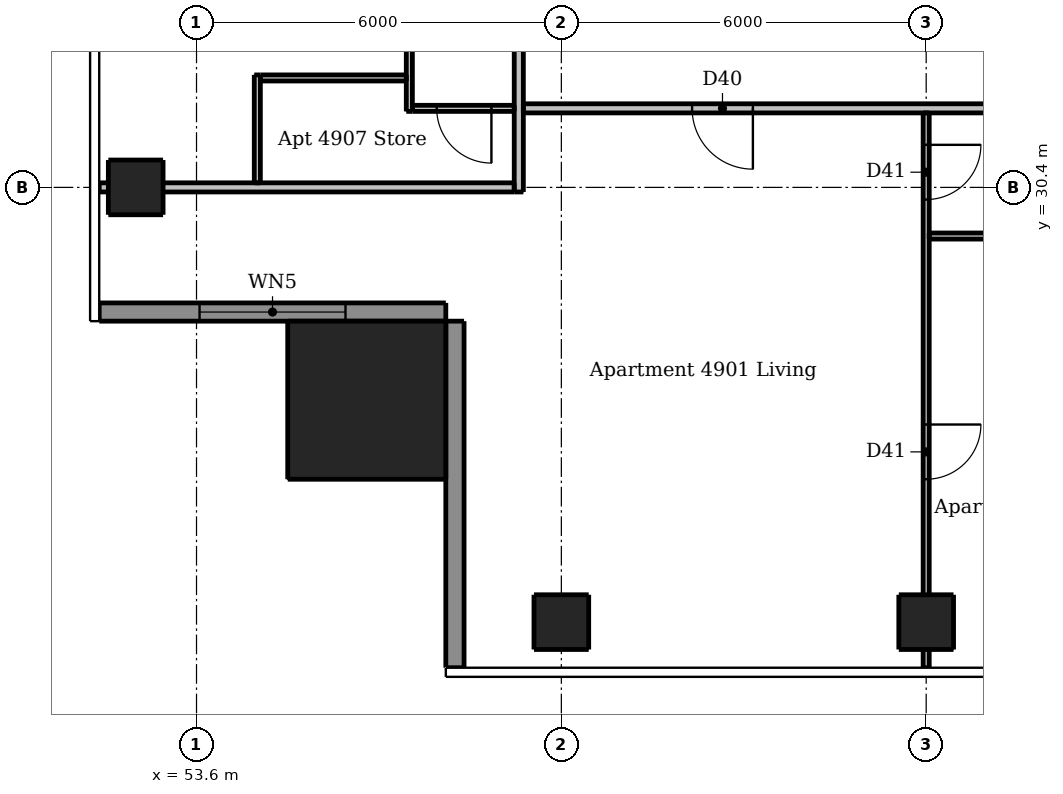
"""IFC4 building model, lengths in metres.
Left out: names, types, materials, properties, quantities, classifications, styles, units other than length and angle.
Written with IfcOpenShell. Run it as: python <this file> out.ifc"""

import sys

from ifc_helpers import new_model, si_unit, direction, frame, frame_2d, origin, origin_2d, place, context, subcontext, project, spatial, rectangle, extrude, element, fill, save


model = new_model("IFC4")
c1 = context("Model", 3, precision=1e-05, world=origin(), true_north=direction((0.0, 1.0)))
c2 = subcontext(c1, "Body", "Model", "MODEL_VIEW")
j1 = project(units=[si_unit("LENGTHUNIT", "METRE"), si_unit("PLANEANGLEUNIT", "RADIAN")], contexts=[c1])
p1 = place(None, origin())
s1 = spatial("IfcSite", under=j1, at=p1, CompositionType="ELEMENT")
p2 = place(p1, origin())
s2 = spatial("IfcBuilding", under=s1, at=p2, CompositionType="ELEMENT")
p3 = place(p2, frame((0.0, 0.0, 187.0)))
s3 = spatial("IfcBuildingStorey", under=s2, at=p3, CompositionType="ELEMENT", Elevation=187.0)
for number, where, z_axis, x_axis in (
    (1, (59.6, 23.25, 0.0), (0.0, 0.0, 1.0), (1.0, 0.0, 0.0)),
    (2, (65.6, 23.25, 0.0), (0.0, 0.0, 1.0), (1.0, 0.0, 0.0)),
    (3, (52.6, 30.4, 0.0), (0.0, 0.0, 1.0), (1.0, 0.0, 0.0)),
):
    element("IfcColumn", number, at=place(p3, frame(where, z_axis=z_axis, x_axis=x_axis)), inside=s3, PredefinedType="COLUMN", context=c2, shape_type="SweptSolid", body=[
        extrude(rectangle(XDim=0.9, YDim=0.9, at=origin_2d()), origin(), (0.0, 0.0, 1.0), 3.05),
    ])
p4 = place(p3, frame((56.4, 26.9, 0.0), z_axis=(0.0, 0.0, 1.0), x_axis=(1.0, 0.0, 0.0)))
e4 = element("IfcColumn", 4, at=p4, inside=s3, PredefinedType="COLUMN", context=c2, shape_type="SweptSolid", body=[
    extrude(rectangle(XDim=2.6, YDim=2.6, at=origin_2d()), origin(), (0.0, 0.0, 1.0), 3.3),
])
p5 = place(p3, frame((52.0, 28.35, 0.0), z_axis=(0.0, 0.0, 1.0), x_axis=(1.0, 0.0, 0.0)))
e5 = element("IfcWall", 5, at=p5, inside=s3, PredefinedType="SOLIDWALL", context=c2, shape_type="SweptSolid", body=[
    extrude(rectangle(XDim=5.7, YDim=0.3, at=frame_2d((2.85, 0.0))), origin(), (0.0, 0.0, 1.0), 3.05),
])
p6 = place(p5, frame((1.65, 0.0, 0.15)))
e6 = element("IfcOpeningElement", 6, at=p6, cuts=e5, PredefinedType="OPENING", context=c2, shape_type="SweptSolid", body=[
    extrude(rectangle(XDim=2.4, YDim=2.1, at=frame_2d((1.2, 1.05))), frame((0.0, 0.16, 0.0), z_axis=(0.0, -1.0, 0.0), x_axis=(1.0, 0.0, 0.0)), (0.0, 0.0, 1.0), 0.32),
])
p7 = place(p3, frame((57.85, 28.2, 0.0), z_axis=(0.0, 0.0, 1.0), x_axis=(0.0, -1.0, 0.0)))
e7 = element("IfcWall", 7, at=p7, inside=s3, PredefinedType="SOLIDWALL", context=c2, shape_type="SweptSolid", body=[
    extrude(rectangle(XDim=5.7, YDim=0.3, at=frame_2d((2.85, 0.0))), origin(), (0.0, 0.0, 1.0), 3.05),
])
p8 = place(p3, frame((54.6, 30.475, 0.0), z_axis=(0.0, 0.0, 1.0), x_axis=(0.0, 1.0, 0.0)))
e8 = element("IfcWall", 8, at=p8, inside=s3, PredefinedType="PARTITIONING", context=c2, shape_type="SweptSolid", body=[
    extrude(rectangle(XDim=1.775, YDim=0.1, at=frame_2d((0.887, 0.0))), origin(), (0.0, 0.0, 1.0), 3.05),
])
p9 = place(p3, frame((57.1, 31.65, 0.0), z_axis=(0.0, 0.0, 1.0), x_axis=(0.0, 1.0, 0.0)))
e9 = element("IfcWall", 9, at=p9, inside=s3, PredefinedType="PARTITIONING", context=c2, shape_type="SweptSolid", body=[
    extrude(rectangle(XDim=16.675, YDim=0.1, at=frame_2d((8.337, 0.0))), origin(), (0.0, 0.0, 1.0), 3.05),
])
p10 = place(p9, frame((3.7, 0.0, 0.0)))
e10 = element("IfcOpeningElement", 10, at=p10, cuts=e9, PredefinedType="OPENING", context=c2, shape_type="SweptSolid", body=[
    extrude(rectangle(XDim=0.9, YDim=2.1, at=frame_2d((0.45, 1.05))), frame((0.0, 0.06, 0.0), z_axis=(0.0, -1.0, 0.0), x_axis=(1.0, 0.0, 0.0)), (0.0, 0.0, 1.0), 0.12),
])
p11 = place(p9, frame((8.8, 0.0, 0.0)))
e11 = element("IfcOpeningElement", 11, at=p11, cuts=e9, PredefinedType="OPENING", context=c2, shape_type="SweptSolid", body=[
    extrude(rectangle(XDim=0.9, YDim=2.1, at=frame_2d((0.45, 1.05))), frame((0.0, 0.06, 0.0), z_axis=(0.0, -1.0, 0.0), x_axis=(1.0, 0.0, 0.0)), (0.0, 0.0, 1.0), 0.12),
])
p12 = place(p9, frame((14.5, 0.0, 0.0)))
e12 = element("IfcOpeningElement", 12, at=p12, cuts=e9, PredefinedType="OPENING", context=c2, shape_type="SweptSolid", body=[
    extrude(rectangle(XDim=0.9, YDim=2.1, at=frame_2d((0.45, 1.05))), frame((0.0, 0.06, 0.0), z_axis=(0.0, -1.0, 0.0), x_axis=(1.0, 0.0, 0.0)), (0.0, 0.0, 1.0), 0.12),
])
p13 = place(p9, frame((11.55, 0.0, 0.0)))
e13 = element("IfcOpeningElement", 13, at=p13, cuts=e9, PredefinedType="OPENING", context=c2, shape_type="SweptSolid", body=[
    extrude(rectangle(XDim=0.8, YDim=2.1, at=frame_2d((0.4, 1.05))), frame((0.0, 0.06, 0.0), z_axis=(0.0, -1.0, 0.0), x_axis=(1.0, 0.0, 0.0)), (0.0, 0.0, 1.0), 0.12),
])
p14 = place(p3, frame((65.6, 31.625, 0.0), z_axis=(0.0, 0.0, 1.0), x_axis=(0.0, -1.0, 0.0)))
e14 = element("IfcWall", 14, at=p14, inside=s3, PredefinedType="PARTITIONING", context=c2, shape_type="SweptSolid", body=[
    extrude(rectangle(XDim=9.125, YDim=0.1, at=frame_2d((4.562, 0.0))), origin(), (0.0, 0.0, 1.0), 2.516),
])
p15 = place(p14, frame((0.525, 0.0, 0.0)))
e15 = element("IfcOpeningElement", 15, at=p15, cuts=e14, PredefinedType="OPENING", context=c2, shape_type="SweptSolid", body=[
    extrude(rectangle(XDim=0.9, YDim=2.1, at=frame_2d((0.45, 1.05))), frame((0.0, 0.06, 0.0), z_axis=(0.0, -1.0, 0.0), x_axis=(1.0, 0.0, 0.0)), (0.0, 0.0, 1.0), 0.12),
])
p16 = place(p14, frame((5.125, 0.0, 0.0)))
e16 = element("IfcOpeningElement", 16, at=p16, cuts=e14, PredefinedType="OPENING", context=c2, shape_type="SweptSolid", body=[
    extrude(rectangle(XDim=0.9, YDim=2.1, at=frame_2d((0.45, 1.05))), frame((0.0, 0.06, 0.0), z_axis=(0.0, -1.0, 0.0), x_axis=(1.0, 0.0, 0.0)), (0.0, 0.0, 1.0), 0.12),
])
p17 = place(p3, frame((54.65, 32.2, 0.0), z_axis=(0.0, 0.0, 1.0), x_axis=(1.0, 0.0, 0.0)))
e17 = element("IfcWall", 17, at=p17, inside=s3, PredefinedType="PARTITIONING", context=c2, shape_type="SweptSolid", body=[
    extrude(rectangle(XDim=2.4, YDim=0.1, at=frame_2d((1.2, 0.0))), origin(), (0.0, 0.0, 1.0), 3.05),
])
p18 = place(p3, frame((58.825, 31.7, 0.0), z_axis=(0.0, 0.0, 1.0), x_axis=(-1.0, 0.0, 0.0)))
e18 = element("IfcWall", 18, at=p18, inside=s3, PredefinedType="PARTITIONING", context=c2, shape_type="SweptSolid", body=[
    extrude(rectangle(XDim=1.675, YDim=0.1, at=frame_2d((0.837, 0.0))), origin(), (0.0, 0.0, 1.0), 3.05),
])
p19 = place(p18, frame((0.375, 0.0, 0.0)))
e19 = element("IfcOpeningElement", 19, at=p19, cuts=e18, PredefinedType="OPENING", context=c2, shape_type="SweptSolid", body=[
    extrude(rectangle(XDim=0.9, YDim=2.1, at=frame_2d((0.45, 1.05))), frame((0.0, 0.06, 0.0), z_axis=(0.0, -1.0, 0.0), x_axis=(1.0, 0.0, 0.0)), (0.0, 0.0, 1.0), 0.12),
])
p20 = place(p3, frame((65.65, 29.6, 0.0), z_axis=(0.0, 0.0, 1.0), x_axis=(1.0, 0.0, 0.0)))
e20 = element("IfcWall", 20, at=p20, inside=s3, PredefinedType="PARTITIONING", context=c2, shape_type="SweptSolid", body=[
    extrude(rectangle(XDim=5.875, YDim=0.1, at=frame_2d((2.938, 0.0))), origin(), (0.0, 0.0, 1.0), 3.05),
])
p21 = place(p20, frame((3.75, 0.0, 0.0)))
e21 = element("IfcOpeningElement", 21, at=p21, cuts=e20, PredefinedType="OPENING", context=c2, shape_type="SweptSolid", body=[
    extrude(rectangle(XDim=0.8, YDim=2.1, at=frame_2d((0.4, 1.05))), frame((0.0, 0.06, 0.0), z_axis=(0.0, -1.0, 0.0), x_axis=(1.0, 0.0, 0.0)), (0.0, 0.0, 1.0), 0.12),
])
p22 = place(p3, frame((58.9, 30.325, 0.0), z_axis=(0.0, 0.0, 1.0), x_axis=(0.0, 1.0, 0.0)))
e22 = element("IfcWall", 22, at=p22, inside=s3, PredefinedType="PARTITIONING", context=c2, shape_type="SweptSolid", body=[
    extrude(rectangle(XDim=30.85, YDim=0.15, at=frame_2d((15.425, 0.0))), origin(), (0.0, 0.0, 1.0), 3.05),
])
p23 = place(p22, frame((9.225, 0.0, 0.0)))
e23 = element("IfcOpeningElement", 23, at=p23, cuts=e22, PredefinedType="OPENING", context=c2, shape_type="SweptSolid", body=[
    extrude(rectangle(XDim=1.0, YDim=2.1, at=frame_2d((0.5, 1.05))), frame((0.0, 0.085, 0.0), z_axis=(0.0, -1.0, 0.0), x_axis=(1.0, 0.0, 0.0)), (0.0, 0.0, 1.0), 0.17),
])
p24 = place(p22, frame((26.925, 0.0, 0.0)))
e24 = element("IfcOpeningElement", 24, at=p24, cuts=e22, PredefinedType="OPENING", context=c2, shape_type="SweptSolid", body=[
    extrude(rectangle(XDim=1.0, YDim=2.1, at=frame_2d((0.5, 1.05))), frame((0.0, 0.085, 0.0), z_axis=(0.0, -1.0, 0.0), x_axis=(1.0, 0.0, 0.0)), (0.0, 0.0, 1.0), 0.17),
])
p25 = place(p3, frame((89.525, 31.7, 0.0), z_axis=(0.0, 0.0, 1.0), x_axis=(-1.0, 0.0, 0.0)))
e25 = element("IfcWall", 25, at=p25, inside=s3, PredefinedType="PARTITIONING", context=c2, shape_type="SweptSolid", body=[
    extrude(rectangle(XDim=30.55, YDim=0.15, at=frame_2d((15.275, 0.0))), origin(), (0.0, 0.0, 1.0), 3.05),
])
p26 = place(p25, frame((26.775, 0.0, 0.0)))
e26 = element("IfcOpeningElement", 26, at=p26, cuts=e25, PredefinedType="OPENING", context=c2, shape_type="SweptSolid", body=[
    extrude(rectangle(XDim=1.0, YDim=2.1, at=frame_2d((0.5, 1.05))), frame((0.0, 0.085, 0.0), z_axis=(0.0, -1.0, 0.0), x_axis=(1.0, 0.0, 0.0)), (0.0, 0.0, 1.0), 0.17),
])
p27 = place(p25, frame((9.075, 0.0, 0.0)))
e27 = element("IfcOpeningElement", 27, at=p27, cuts=e25, PredefinedType="OPENING", context=c2, shape_type="SweptSolid", body=[
    extrude(rectangle(XDim=1.0, YDim=2.1, at=frame_2d((0.5, 1.05))), frame((0.0, 0.085, 0.0), z_axis=(0.0, -1.0, 0.0), x_axis=(1.0, 0.0, 0.0)), (0.0, 0.0, 1.0), 0.17),
])
p28 = place(p3, frame((52.0, 30.4, 0.0), z_axis=(0.0, 0.0, 1.0), x_axis=(1.0, 0.0, 0.0)))
e28 = element("IfcWall", 28, at=p28, inside=s3, PredefinedType="PARTITIONING", context=c2, shape_type="SweptSolid", body=[
    extrude(rectangle(XDim=6.825, YDim=0.15, at=frame_2d((3.413, 0.0))), origin(), (0.0, 0.0, 1.0), 2.647),
])
p29 = place(p6, origin())
e29 = element("IfcWindow", 29, at=p29, inside=s3, PartitioningType="DOUBLE_PANEL_VERTICAL", PredefinedType="WINDOW", context=c2, shape_type="SweptSolid", body=[
    extrude(rectangle(XDim=2.4, YDim=2.1, at=frame_2d((1.2, 1.05))), frame((0.0, 0.03, 0.0), z_axis=(0.0, -1.0, 0.0), x_axis=(1.0, 0.0, 0.0)), (0.0, 0.0, 1.0), 0.06),
])
fill(e6, e29)
p30 = place(p26, origin())
e30 = element("IfcDoor", 30, at=p30, inside=s3, OperationType="SINGLE_SWING_LEFT", PredefinedType="DOOR", context=c2, shape_type="SweptSolid", body=[
    extrude(rectangle(XDim=1.0, YDim=2.1, at=frame_2d((0.5, 1.05))), frame((0.0, 0.025, 0.0), z_axis=(0.0, -1.0, 0.0), x_axis=(1.0, 0.0, 0.0)), (0.0, 0.0, 1.0), 0.05),
])
fill(e26, e30)
p31 = place(p15, origin())
e31 = element("IfcDoor", 31, at=p31, inside=s3, OperationType="SINGLE_SWING_LEFT", PredefinedType="DOOR", context=c2, shape_type="SweptSolid", body=[
    extrude(rectangle(XDim=0.9, YDim=2.1, at=frame_2d((0.45, 1.05))), frame((0.0, 0.025, 0.0), z_axis=(0.0, -1.0, 0.0), x_axis=(1.0, 0.0, 0.0)), (0.0, 0.0, 1.0), 0.05),
])
fill(e15, e31)
p32 = place(p16, origin())
e32 = element("IfcDoor", 32, at=p32, inside=s3, OperationType="SINGLE_SWING_LEFT", PredefinedType="DOOR", context=c2, shape_type="SweptSolid", body=[
    extrude(rectangle(XDim=0.9, YDim=2.1, at=frame_2d((0.45, 1.05))), frame((0.0, 0.025, 0.0), z_axis=(0.0, -1.0, 0.0), x_axis=(1.0, 0.0, 0.0)), (0.0, 0.0, 1.0), 0.05),
])
fill(e16, e32)
p33 = place(p19, origin())
e33 = element("IfcDoor", 33, at=p33, inside=s3, OperationType="SINGLE_SWING_LEFT", PredefinedType="DOOR", context=c2, shape_type="SweptSolid", body=[
    extrude(rectangle(XDim=0.9, YDim=2.1, at=frame_2d((0.45, 1.05))), frame((0.0, 0.025, 0.0), z_axis=(0.0, -1.0, 0.0), x_axis=(1.0, 0.0, 0.0)), (0.0, 0.0, 1.0), 0.05),
])
fill(e19, e33)
save(model, sys.argv[1])
